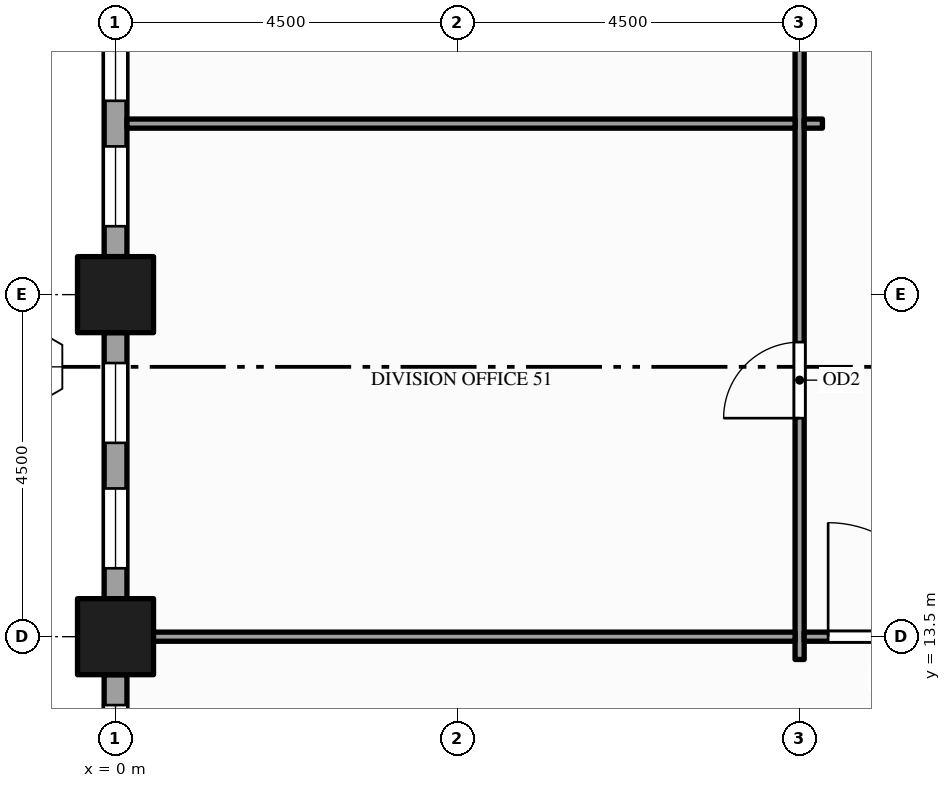
"""IFC4 building model, lengths in metres.
Left out: names, types, materials, properties, quantities, classifications, styles, units other than length and angle.
Written with IfcOpenShell. Run it as: python <this file> out.ifc"""

import sys

from ifc_helpers import new_model, si_unit, direction, frame, frame_2d, origin, origin_2d, place, context, subcontext, project, spatial, rectangle, hollow_rectangle, extrude, element, fill, save


model = new_model("IFC4")
c1 = context("Model", 3, precision=1e-05, world=origin(), true_north=direction((0.0, 1.0)))
c2 = subcontext(c1, "Body", "Model", "MODEL_VIEW")
j1 = project(units=[si_unit("LENGTHUNIT", "METRE"), si_unit("PLANEANGLEUNIT", "RADIAN")], contexts=[c1])
p1 = place(None, origin())
s1 = spatial("IfcSite", under=j1, at=p1, CompositionType="ELEMENT")
p2 = place(p1, origin())
s2 = spatial("IfcBuilding", under=s1, at=p2, CompositionType="ELEMENT")
p3 = place(p2, frame((0.0, 0.0, 127.0)))
s3 = spatial("IfcBuildingStorey", under=s2, at=p3, CompositionType="ELEMENT", Elevation=127.0)
for number, where, z_axis, x_axis in (
    (1, (0.0, 13.5, -0.15), (0.0, 0.0, 1.0), (1.0, 0.0, 0.0)),
    (2, (0.0, 18.0, -0.15), (0.0, 0.0, 1.0), (1.0, 0.0, 0.0)),
):
    element("IfcColumn", number, at=place(p3, frame(where, z_axis=z_axis, x_axis=x_axis)), inside=s3, PredefinedType="COLUMN", context=c2, shape_type="SweptSolid", body=[
        extrude(hollow_rectangle(XDim=1.0, YDim=1.0, WallThickness=0.05, at=origin_2d()), origin(), (0.0, 0.0, 1.0), 3.9),
    ])
p4 = place(p3, frame((0.0, 22.0, 0.0), z_axis=(0.0, 0.0, 1.0), x_axis=(0.0, -1.0, 0.0)))
e3 = element("IfcWall", 3, at=p4, inside=s3, PredefinedType="STANDARD", context=c2, shape_type="SweptSolid", body=[
    extrude(rectangle(XDim=3.5, YDim=0.3, at=frame_2d((1.75, 0.0))), origin(), (0.0, 0.0, 1.0), 3.054),
])
p5 = place(p4, frame((0.4, 0.0, 0.9)))
e4 = element("IfcOpeningElement", 4, at=p5, cuts=e3, PredefinedType="OPENING", context=c2, shape_type="SweptSolid", body=[
    extrude(rectangle(XDim=1.05, YDim=2.0, at=frame_2d((0.525, 1.0))), frame((0.0, 0.16, 0.0), z_axis=(0.0, -1.0, 0.0), x_axis=(1.0, 0.0, 0.0)), (0.0, 0.0, 1.0), 0.32),
])
p6 = place(p4, frame((2.05, 0.0, 0.9)))
e5 = element("IfcOpeningElement", 5, at=p6, cuts=e3, PredefinedType="OPENING", context=c2, shape_type="SweptSolid", body=[
    extrude(rectangle(XDim=1.05, YDim=2.0, at=frame_2d((0.525, 1.0))), frame((0.0, 0.16, 0.0), z_axis=(0.0, -1.0, 0.0), x_axis=(1.0, 0.0, 0.0)), (0.0, 0.0, 1.0), 0.32),
])
p7 = place(p3, frame((0.0, 17.5, 0.0), z_axis=(0.0, 0.0, 1.0), x_axis=(0.0, -1.0, 0.0)))
e6 = element("IfcWall", 6, at=p7, inside=s3, PredefinedType="STANDARD", context=c2, shape_type="SweptSolid", body=[
    extrude(rectangle(XDim=3.5, YDim=0.3, at=frame_2d((1.75, 0.0))), origin(), (0.0, 0.0, 1.0), 3.054),
])
p8 = place(p7, frame((0.4, 0.0, 0.9)))
e7 = element("IfcOpeningElement", 7, at=p8, cuts=e6, PredefinedType="OPENING", context=c2, shape_type="SweptSolid", body=[
    extrude(rectangle(XDim=1.05, YDim=2.0, at=frame_2d((0.525, 1.0))), frame((0.0, 0.16, 0.0), z_axis=(0.0, -1.0, 0.0), x_axis=(1.0, 0.0, 0.0)), (0.0, 0.0, 1.0), 0.32),
])
p9 = place(p7, frame((2.05, 0.0, 0.9)))
e8 = element("IfcOpeningElement", 8, at=p9, cuts=e6, PredefinedType="OPENING", context=c2, shape_type="SweptSolid", body=[
    extrude(rectangle(XDim=1.05, YDim=2.0, at=frame_2d((0.525, 1.0))), frame((0.0, 0.16, 0.0), z_axis=(0.0, -1.0, 0.0), x_axis=(1.0, 0.0, 0.0)), (0.0, 0.0, 1.0), 0.32),
])
p10 = place(p3, frame((0.0, 13.0, 0.0), z_axis=(0.0, 0.0, 1.0), x_axis=(0.0, -1.0, 0.0)))
e9 = element("IfcWall", 9, at=p10, inside=s3, PredefinedType="STANDARD", context=c2, shape_type="SweptSolid", body=[
    extrude(rectangle(XDim=3.5, YDim=0.3, at=frame_2d((1.75, 0.0))), origin(), (0.0, 0.0, 1.0), 3.054),
])
p11 = place(p10, frame((0.4, 0.0, 0.9)))
e10 = element("IfcOpeningElement", 10, at=p11, cuts=e9, PredefinedType="OPENING", context=c2, shape_type="SweptSolid", body=[
    extrude(rectangle(XDim=1.05, YDim=2.0, at=frame_2d((0.525, 1.0))), frame((0.0, 0.16, 0.0), z_axis=(0.0, -1.0, 0.0), x_axis=(1.0, 0.0, 0.0)), (0.0, 0.0, 1.0), 0.32),
])
p12 = place(p10, frame((2.05, 0.0, 0.9)))
e11 = element("IfcOpeningElement", 11, at=p12, cuts=e9, PredefinedType="OPENING", context=c2, shape_type="SweptSolid", body=[
    extrude(rectangle(XDim=1.05, YDim=2.0, at=frame_2d((0.525, 1.0))), frame((0.0, 0.16, 0.0), z_axis=(0.0, -1.0, 0.0), x_axis=(1.0, 0.0, 0.0)), (0.0, 0.0, 1.0), 0.32),
])
p13 = place(p3, frame((9.0, 13.2, 0.0), z_axis=(0.0, 0.0, 1.0), x_axis=(0.0, 1.0, 0.0)))
e12 = element("IfcWall", 12, at=p13, inside=s3, PredefinedType="PARTITIONING", context=c2, shape_type="SweptSolid", body=[
    extrude(rectangle(XDim=18.6, YDim=0.12, at=frame_2d((9.3, 0.0))), origin(), (0.0, 0.0, 1.0), 2.5),
])
p14 = place(p13, frame((3.175, 0.0, 0.0)))
e13 = element("IfcOpeningElement", 13, at=p14, cuts=e12, PredefinedType="OPENING", context=c2, shape_type="SweptSolid", body=[
    extrude(rectangle(XDim=1.0, YDim=2.1, at=frame_2d((0.5, 1.05))), frame((0.0, 0.07, 0.0), z_axis=(0.0, -1.0, 0.0), x_axis=(1.0, 0.0, 0.0)), (0.0, 0.0, 1.0), 0.14),
])
p15 = place(p13, frame((9.955, 0.0, 0.0)))
e14 = element("IfcOpeningElement", 14, at=p15, cuts=e12, PredefinedType="OPENING", context=c2, shape_type="SweptSolid", body=[
    extrude(rectangle(XDim=1.0, YDim=2.1, at=frame_2d((0.5, 1.05))), frame((0.0, 0.07, 0.0), z_axis=(0.0, -1.0, 0.0), x_axis=(1.0, 0.0, 0.0)), (0.0, 0.0, 1.0), 0.14),
])
p16 = place(p3, frame((0.15, 13.5, 0.0), z_axis=(0.0, 0.0, 1.0), x_axis=(1.0, 0.0, 0.0)))
e15 = element("IfcWall", 15, at=p16, inside=s3, PredefinedType="PARTITIONING", context=c2, shape_type="SweptSolid", body=[
    extrude(rectangle(XDim=8.79, YDim=0.12, at=frame_2d((4.395, 0.0))), origin(), (0.0, 0.0, 1.0), 2.838),
])
p17 = place(p3, frame((9.06, 13.5, 0.0), z_axis=(0.0, 0.0, 1.0), x_axis=(1.0, 0.0, 0.0)))
e16 = element("IfcWall", 16, at=p17, inside=s3, PredefinedType="PARTITIONING", context=c2, shape_type="SweptSolid", body=[
    extrude(rectangle(XDim=2.13, YDim=0.12, at=frame_2d((1.065, 0.0))), origin(), (0.0, 0.0, 1.0), 2.838),
])
p18 = place(p17, frame((0.315, 0.0, 0.0)))
e17 = element("IfcOpeningElement", 17, at=p18, cuts=e16, PredefinedType="OPENING", context=c2, shape_type="SweptSolid", body=[
    extrude(rectangle(XDim=1.5, YDim=2.1, at=frame_2d((0.75, 1.05))), frame((0.0, 0.07, 0.0), z_axis=(0.0, -1.0, 0.0), x_axis=(1.0, 0.0, 0.0)), (0.0, 0.0, 1.0), 0.14),
])
p19 = place(p3, frame((0.15, 20.25, 0.0), z_axis=(0.0, 0.0, 1.0), x_axis=(1.0, 0.0, 0.0)))
e18 = element("IfcWall", 18, at=p19, inside=s3, PredefinedType="PARTITIONING", context=c2, shape_type="SweptSolid", body=[
    extrude(rectangle(XDim=8.79, YDim=0.12, at=frame_2d((4.395, 0.0))), origin(), (0.0, 0.0, 1.0), 2.838),
])
p20 = place(p3, frame((9.06, 20.25, 0.0), z_axis=(0.0, 0.0, 1.0), x_axis=(1.0, 0.0, 0.0)))
e19 = element("IfcWall", 19, at=p20, inside=s3, PredefinedType="PARTITIONING", context=c2, shape_type="SweptSolid", body=[
    extrude(rectangle(XDim=0.24, YDim=0.12, at=frame_2d((0.12, 0.0))), origin(), (0.0, 0.0, 1.0), 2.838),
])
p21 = place(p5, origin())
e20 = element("IfcWindow", 20, at=p21, inside=s3, PartitioningType="SINGLE_PANEL", PredefinedType="WINDOW", context=c2, shape_type="SweptSolid", body=[
    extrude(rectangle(XDim=1.05, YDim=2.0, at=frame_2d((0.525, 1.0))), frame((0.0, 0.03, 0.0), z_axis=(0.0, -1.0, 0.0), x_axis=(1.0, 0.0, 0.0)), (0.0, 0.0, 1.0), 0.06),
])
fill(e4, e20)
p22 = place(p6, origin())
e21 = element("IfcWindow", 21, at=p22, inside=s3, PartitioningType="SINGLE_PANEL", PredefinedType="WINDOW", context=c2, shape_type="SweptSolid", body=[
    extrude(rectangle(XDim=1.05, YDim=2.0, at=frame_2d((0.525, 1.0))), frame((0.0, 0.03, 0.0), z_axis=(0.0, -1.0, 0.0), x_axis=(1.0, 0.0, 0.0)), (0.0, 0.0, 1.0), 0.06),
])
fill(e5, e21)
p23 = place(p8, origin())
e22 = element("IfcWindow", 22, at=p23, inside=s3, PartitioningType="SINGLE_PANEL", PredefinedType="WINDOW", context=c2, shape_type="SweptSolid", body=[
    extrude(rectangle(XDim=1.05, YDim=2.0, at=frame_2d((0.525, 1.0))), frame((0.0, 0.03, 0.0), z_axis=(0.0, -1.0, 0.0), x_axis=(1.0, 0.0, 0.0)), (0.0, 0.0, 1.0), 0.06),
])
fill(e7, e22)
p24 = place(p9, origin())
e23 = element("IfcWindow", 23, at=p24, inside=s3, PartitioningType="SINGLE_PANEL", PredefinedType="WINDOW", context=c2, shape_type="SweptSolid", body=[
    extrude(rectangle(XDim=1.05, YDim=2.0, at=frame_2d((0.525, 1.0))), frame((0.0, 0.03, 0.0), z_axis=(0.0, -1.0, 0.0), x_axis=(1.0, 0.0, 0.0)), (0.0, 0.0, 1.0), 0.06),
])
fill(e8, e23)
p25 = place(p11, origin())
e24 = element("IfcWindow", 24, at=p25, inside=s3, PartitioningType="SINGLE_PANEL", PredefinedType="WINDOW", context=c2, shape_type="SweptSolid", body=[
    extrude(rectangle(XDim=1.05, YDim=2.0, at=frame_2d((0.525, 1.0))), frame((0.0, 0.03, 0.0), z_axis=(0.0, -1.0, 0.0), x_axis=(1.0, 0.0, 0.0)), (0.0, 0.0, 1.0), 0.06),
])
fill(e10, e24)
p26 = place(p18, origin())
e25 = element("IfcDoor", 25, at=p26, inside=s3, OperationType="SINGLE_SWING_LEFT", PredefinedType="DOOR", context=c2, shape_type="SweptSolid", body=[
    extrude(rectangle(XDim=1.5, YDim=2.1, at=frame_2d((0.75, 1.05))), frame((0.0, 0.025, 0.0), z_axis=(0.0, -1.0, 0.0), x_axis=(1.0, 0.0, 0.0)), (0.0, 0.0, 1.0), 0.05),
])
fill(e17, e25)
p27 = place(p14, origin())
e26 = element("IfcDoor", 26, at=p27, inside=s3, OperationType="SINGLE_SWING_LEFT", PredefinedType="DOOR", context=c2, shape_type="SweptSolid", body=[
    extrude(rectangle(XDim=1.0, YDim=2.1, at=frame_2d((0.5, 1.05))), frame((0.0, 0.025, 0.0), z_axis=(0.0, -1.0, 0.0), x_axis=(1.0, 0.0, 0.0)), (0.0, 0.0, 1.0), 0.05),
])
fill(e13, e26)
save(model, sys.argv[1])
